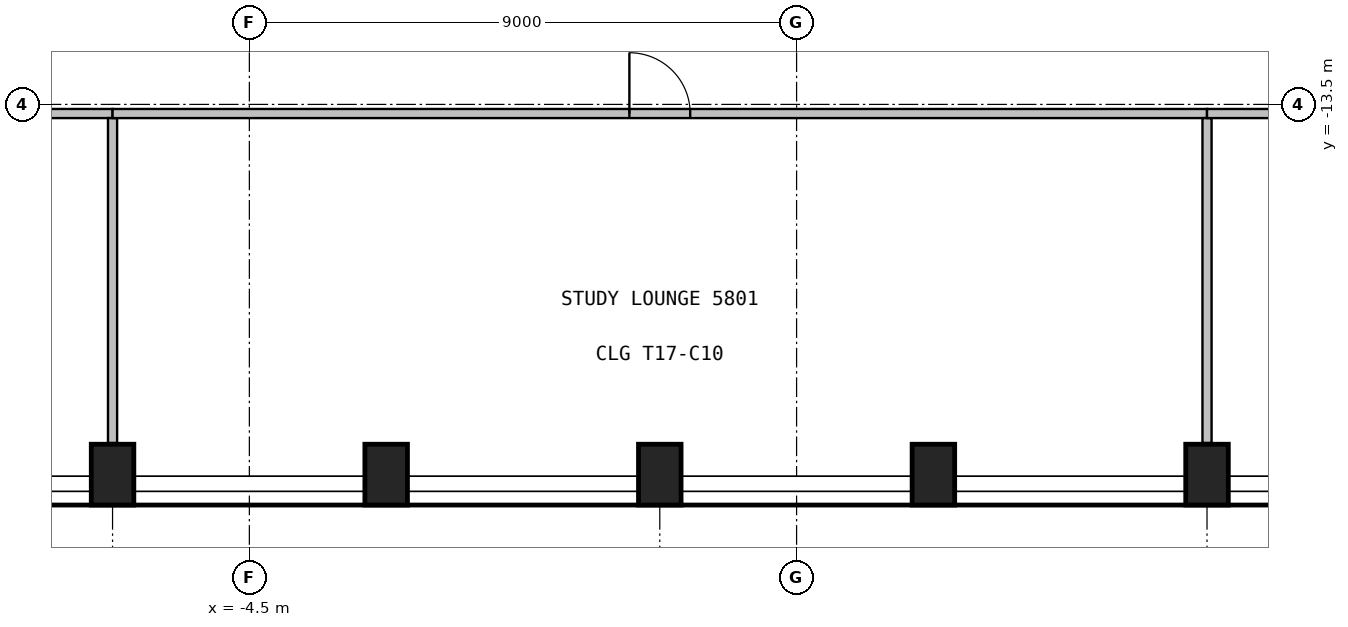
"""IFC4 building model, lengths in metres.
Left out: names, types, materials, properties, quantities, classifications, styles, units other than length and angle.
Written with IfcOpenShell. Run it as: python <this file> out.ifc"""

import sys

from ifc_helpers import new_model, si_unit, direction, frame, frame_2d, origin, origin_2d, place, context, subcontext, project, spatial, rectangle, extrude, element, fill, save


model = new_model("IFC4")
c1 = context("Model", 3, precision=1e-05, world=origin(), true_north=direction((0.0, 1.0)))
c2 = subcontext(c1, "Body", "Model", "MODEL_VIEW")
j1 = project(units=[si_unit("LENGTHUNIT", "METRE"), si_unit("PLANEANGLEUNIT", "RADIAN")], contexts=[c1])
p1 = place(None, origin())
s1 = spatial("IfcSite", under=j1, at=p1, CompositionType="ELEMENT")
p2 = place(p1, origin())
s2 = spatial("IfcBuilding", under=s1, at=p2, CompositionType="ELEMENT")
p3 = place(p2, frame((0.0, 0.0, 235.2)))
s3 = spatial("IfcBuildingStorey", under=s2, at=p3, CompositionType="ELEMENT", Elevation=235.2)
for number, where, z_axis, x_axis in (
    (1, (-6.75, -19.588, 0.0), (0.0, 0.0, 1.0), (1.0, 0.0, 0.0)),
    (2, (-2.25, -19.588, 0.0), (0.0, 0.0, 1.0), (1.0, 0.0, 0.0)),
    (3, (2.25, -19.588, 0.0), (0.0, 0.0, 1.0), (1.0, 0.0, 0.0)),
    (4, (6.75, -19.588, 0.0), (0.0, 0.0, 1.0), (1.0, 0.0, 0.0)),
    (5, (11.25, -19.588, 0.0), (0.0, 0.0, 1.0), (1.0, 0.0, 0.0)),
):
    element("IfcColumn", number, at=place(p3, frame(where, z_axis=z_axis, x_axis=x_axis)), inside=s3, PredefinedType="COLUMN", context=c2, shape_type="SweptSolid", body=[
        extrude(rectangle(XDim=0.7, YDim=1.0, at=origin_2d()), origin(), (0.0, 0.0, 1.0), 3.575),
    ])
p4 = place(p3, frame((-15.825, -13.65, 0.0), z_axis=(0.0, 0.0, 1.0), x_axis=(1.0, 0.0, 0.0)))
e6 = element("IfcWall", 6, at=p4, inside=s3, PredefinedType="PARTITIONING", context=c2, shape_type="SweptSolid", body=[
    extrude(rectangle(XDim=9.075, YDim=0.15, at=frame_2d((4.538, 0.0))), origin(), (0.0, 0.0, 1.0), 3.575),
])
p5 = place(p4, frame((4.038, 0.0, 0.0)))
e7 = element("IfcOpeningElement", 7, at=p5, cuts=e6, PredefinedType="OPENING", context=c2, shape_type="SweptSolid", body=[
    extrude(rectangle(XDim=1.0, YDim=2.1, at=frame_2d((0.5, 1.05))), frame((0.0, 0.085, 0.0), z_axis=(0.0, -1.0, 0.0), x_axis=(1.0, 0.0, 0.0)), (0.0, 0.0, 1.0), 0.17),
])
p6 = place(p3, frame((-6.75, -13.725, 0.0), z_axis=(0.0, 0.0, 1.0), x_axis=(0.0, -1.0, 0.0)))
e8 = element("IfcWall", 8, at=p6, inside=s3, PredefinedType="PARTITIONING", context=c2, shape_type="SweptSolid", body=[
    extrude(rectangle(XDim=5.344, YDim=0.15, at=frame_2d((2.672, 0.0))), origin(), (0.0, 0.0, 1.0), 3.575),
])
p7 = place(p3, frame((-6.75, -13.65, 0.0), z_axis=(0.0, 0.0, 1.0), x_axis=(1.0, 0.0, 0.0)))
e9 = element("IfcWall", 9, at=p7, inside=s3, PredefinedType="PARTITIONING", context=c2, shape_type="SweptSolid", body=[
    extrude(rectangle(XDim=18.0, YDim=0.15, at=frame_2d((9.0, 0.0))), origin(), (0.0, 0.0, 1.0), 3.575),
])
p8 = place(p7, frame((8.5, 0.0, 0.0)))
e10 = element("IfcOpeningElement", 10, at=p8, cuts=e9, PredefinedType="OPENING", context=c2, shape_type="SweptSolid", body=[
    extrude(rectangle(XDim=1.0, YDim=2.1, at=frame_2d((0.5, 1.05))), frame((0.0, 0.085, 0.0), z_axis=(0.0, -1.0, 0.0), x_axis=(1.0, 0.0, 0.0)), (0.0, 0.0, 1.0), 0.17),
])
p9 = place(p3, frame((11.25, -13.725, 0.0), z_axis=(0.0, 0.0, 1.0), x_axis=(0.0, -1.0, 0.0)))
e11 = element("IfcWall", 11, at=p9, inside=s3, PredefinedType="PARTITIONING", context=c2, shape_type="SweptSolid", body=[
    extrude(rectangle(XDim=5.344, YDim=0.15, at=frame_2d((2.672, 0.0))), origin(), (0.0, 0.0, 1.0), 3.575),
])
p10 = place(p3, frame((11.25, -13.65, 0.0), z_axis=(0.0, 0.0, 1.0), x_axis=(1.0, 0.0, 0.0)))
e12 = element("IfcWall", 12, at=p10, inside=s3, PredefinedType="PARTITIONING", context=c2, shape_type="SweptSolid", body=[
    extrude(rectangle(XDim=4.209, YDim=0.15, at=frame_2d((2.104, 0.0))), origin(), (0.0, 0.0, 1.0), 3.575),
])
p11 = place(p10, frame((1.604, 0.0, 0.0)))
e13 = element("IfcOpeningElement", 13, at=p11, cuts=e12, PredefinedType="OPENING", context=c2, shape_type="SweptSolid", body=[
    extrude(rectangle(XDim=1.0, YDim=2.1, at=frame_2d((0.5, 1.05))), frame((0.0, 0.085, 0.0), z_axis=(0.0, -1.0, 0.0), x_axis=(1.0, 0.0, 0.0)), (0.0, 0.0, 1.0), 0.17),
])
p12 = place(p8, origin())
e14 = element("IfcDoor", 14, at=p12, inside=s3, OperationType="SINGLE_SWING_LEFT", PredefinedType="DOOR", context=c2, shape_type="SweptSolid", body=[
    extrude(rectangle(XDim=1.0, YDim=2.1, at=frame_2d((0.5, 1.05))), frame((0.0, 0.025, 0.0), z_axis=(0.0, -1.0, 0.0), x_axis=(1.0, 0.0, 0.0)), (0.0, 0.0, 1.0), 0.05),
])
fill(e10, e14)
save(model, sys.argv[1])
